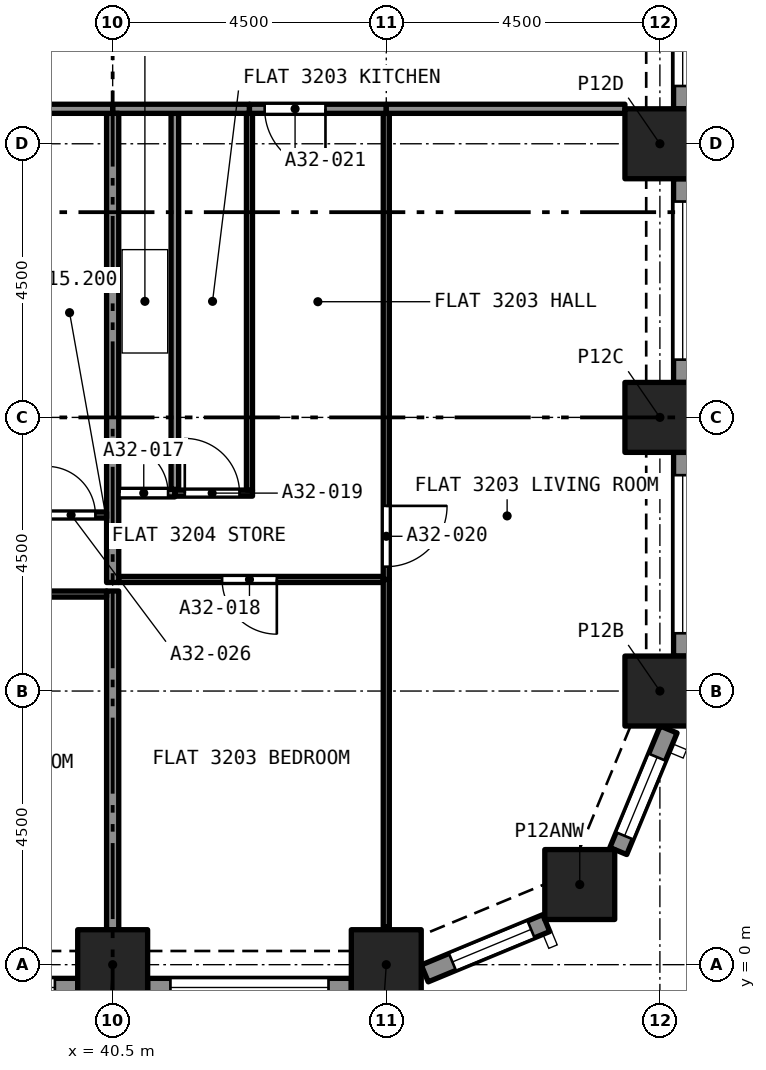
"""IFC4 building model, lengths in metres.
Left out: names, types, materials, properties, quantities, classifications, styles, units other than length and angle.
Written with IfcOpenShell. Run it as: python <this file> out.ifc"""

import sys

from ifc_helpers import new_model, si_unit, direction, frame, frame_2d, origin, origin_2d, place, context, subcontext, project, spatial, rectangle, extrude, element, fill, save


model = new_model("IFC4")
c1 = context("Model", 3, precision=1e-05, world=origin(), true_north=direction((0.0, 1.0)))
c2 = subcontext(c1, "Body", "Model", "MODEL_VIEW")
j1 = project(units=[si_unit("LENGTHUNIT", "METRE"), si_unit("PLANEANGLEUNIT", "RADIAN")], contexts=[c1])
p1 = place(None, origin())
s1 = spatial("IfcSite", under=j1, at=p1, CompositionType="ELEMENT")
p2 = place(p1, origin())
s2 = spatial("IfcBuilding", under=s1, at=p2, CompositionType="ELEMENT")
p3 = place(p2, frame((0.0, 0.0, 115.2)))
s3 = spatial("IfcBuildingStorey", under=s2, at=p3, CompositionType="ELEMENT", Elevation=115.2)
for number, where, z_axis, x_axis in (
    (1, (40.5, 0.0, 0.0), (0.0, 0.0, 1.0), (1.0, 0.0, 0.0)),
    (2, (45.0, 0.0, 0.0), (0.0, 0.0, 1.0), (1.0, 0.0, 0.0)),
    (3, (48.182, 1.318, 0.0), (0.0, 0.0, 1.0), (1.0, 0.0, 0.0)),
    (4, (49.5, 4.5, 0.0), (0.0, 0.0, 1.0), (1.0, 0.0, 0.0)),
    (5, (49.5, 9.0, 0.0), (0.0, 0.0, 1.0), (1.0, 0.0, 0.0)),
    (6, (49.5, 13.5, 0.0), (0.0, 0.0, 1.0), (1.0, 0.0, 0.0)),
):
    element("IfcColumn", number, at=place(p3, frame(where, z_axis=z_axis, x_axis=x_axis)), inside=s3, PredefinedType="COLUMN", context=c2, shape_type="SweptSolid", body=[
        extrude(rectangle(XDim=1.15, YDim=1.15, at=origin_2d()), origin(), (0.0, 0.0, 1.0), 3.2),
    ])
p4 = place(p3, frame((39.925, -0.375, 0.0), z_axis=(0.0, 0.0, 1.0), x_axis=(-1.0, 0.0, 0.0)))
e7 = element("IfcWall", 7, at=p4, inside=s3, PredefinedType="SOLIDWALL", context=c2, shape_type="SweptSolid", body=[
    extrude(rectangle(XDim=3.35, YDim=0.3, at=frame_2d((1.675, 0.0))), origin(), (0.0, 0.0, 1.0), 3.2),
])
p5 = place(p4, frame((0.375, 0.0, 0.45)))
e8 = element("IfcOpeningElement", 8, at=p5, cuts=e7, PredefinedType="OPENING", context=c2, shape_type="SweptSolid", body=[
    extrude(rectangle(XDim=2.6, YDim=1.95, at=frame_2d((1.3, 0.975))), frame((0.0, 0.16, 0.0), z_axis=(0.0, -1.0, 0.0), x_axis=(1.0, 0.0, 0.0)), (0.0, 0.0, 1.0), 0.32),
])
p6 = place(p3, frame((44.425, -0.375, 0.0), z_axis=(0.0, 0.0, 1.0), x_axis=(-1.0, 0.0, 0.0)))
e9 = element("IfcWall", 9, at=p6, inside=s3, PredefinedType="SOLIDWALL", context=c2, shape_type="SweptSolid", body=[
    extrude(rectangle(XDim=3.35, YDim=0.3, at=frame_2d((1.675, 0.0))), origin(), (0.0, 0.0, 1.0), 3.2),
])
p7 = place(p6, frame((0.375, 0.0, 0.45)))
e10 = element("IfcOpeningElement", 10, at=p7, cuts=e9, PredefinedType="OPENING", context=c2, shape_type="SweptSolid", body=[
    extrude(rectangle(XDim=2.6, YDim=1.95, at=frame_2d((1.3, 0.975))), frame((0.0, 0.16, 0.0), z_axis=(0.0, -1.0, 0.0), x_axis=(1.0, 0.0, 0.0)), (0.0, 0.0, 1.0), 0.32),
])
p8 = place(p3, frame((47.631, 0.684, 0.0), z_axis=(0.0, 0.0, 1.0), x_axis=(-0.923862802911, -0.382723818695, 0.0)))
e11 = element("IfcWall", 11, at=p8, inside=s3, PredefinedType="SOLIDWALL", context=c2, shape_type="SweptSolid", body=[
    extrude(rectangle(XDim=2.164, YDim=0.3, at=frame_2d((1.082, 0.0))), origin(), (0.0, 0.0, 1.0), 3.2),
])
p9 = place(p8, frame((0.271, 0.0, 0.45)))
e12 = element("IfcOpeningElement", 12, at=p9, cuts=e11, PredefinedType="OPENING", context=c2, shape_type="SweptSolid", body=[
    extrude(rectangle(XDim=1.4, YDim=1.95, at=frame_2d((0.7, 0.975))), frame((0.0, 0.16, 0.0), z_axis=(0.0, -1.0, 0.0), x_axis=(1.0, 0.0, 0.0)), (0.0, 0.0, 1.0), 0.32),
])
p10 = place(p3, frame((49.644, 3.868, 0.0), z_axis=(0.0, 0.0, 1.0), x_axis=(-0.382723818695, -0.923862802911, 0.0)))
e13 = element("IfcWall", 13, at=p10, inside=s3, PredefinedType="SOLIDWALL", context=c2, shape_type="SweptSolid", body=[
    extrude(rectangle(XDim=2.164, YDim=0.3, at=frame_2d((1.082, 0.0))), origin(), (0.0, 0.0, 1.0), 3.2),
])
p11 = place(p10, frame((0.493, 0.0, 0.45)))
e14 = element("IfcOpeningElement", 14, at=p11, cuts=e13, PredefinedType="OPENING", context=c2, shape_type="SweptSolid", body=[
    extrude(rectangle(XDim=1.4, YDim=1.95, at=frame_2d((0.7, 0.975))), frame((0.0, 0.16, 0.0), z_axis=(0.0, -1.0, 0.0), x_axis=(1.0, 0.0, 0.0)), (0.0, 0.0, 1.0), 0.32),
])
p12 = place(p3, frame((49.875, 8.425, 0.0), z_axis=(0.0, 0.0, 1.0), x_axis=(0.0, -1.0, 0.0)))
e15 = element("IfcWall", 15, at=p12, inside=s3, PredefinedType="SOLIDWALL", context=c2, shape_type="SweptSolid", body=[
    extrude(rectangle(XDim=3.35, YDim=0.3, at=frame_2d((1.675, 0.0))), origin(), (0.0, 0.0, 1.0), 3.2),
])
p13 = place(p12, frame((0.375, 0.0, 0.45)))
e16 = element("IfcOpeningElement", 16, at=p13, cuts=e15, PredefinedType="OPENING", context=c2, shape_type="SweptSolid", body=[
    extrude(rectangle(XDim=2.6, YDim=1.95, at=frame_2d((1.3, 0.975))), frame((0.0, 0.16, 0.0), z_axis=(0.0, -1.0, 0.0), x_axis=(1.0, 0.0, 0.0)), (0.0, 0.0, 1.0), 0.32),
])
p14 = place(p3, frame((49.875, 12.925, 0.0), z_axis=(0.0, 0.0, 1.0), x_axis=(0.0, -1.0, 0.0)))
e17 = element("IfcWall", 17, at=p14, inside=s3, PredefinedType="SOLIDWALL", context=c2, shape_type="SweptSolid", body=[
    extrude(rectangle(XDim=3.35, YDim=0.3, at=frame_2d((1.675, 0.0))), origin(), (0.0, 0.0, 1.0), 3.2),
])
p15 = place(p14, frame((0.375, 0.0, 0.45)))
e18 = element("IfcOpeningElement", 18, at=p15, cuts=e17, PredefinedType="OPENING", context=c2, shape_type="SweptSolid", body=[
    extrude(rectangle(XDim=2.6, YDim=1.95, at=frame_2d((1.3, 0.975))), frame((0.0, 0.16, 0.0), z_axis=(0.0, -1.0, 0.0), x_axis=(1.0, 0.0, 0.0)), (0.0, 0.0, 1.0), 0.32),
])
p16 = place(p3, frame((49.875, 17.425, 0.0), z_axis=(0.0, 0.0, 1.0), x_axis=(0.0, -1.0, 0.0)))
e19 = element("IfcWall", 19, at=p16, inside=s3, PredefinedType="SOLIDWALL", context=c2, shape_type="SweptSolid", body=[
    extrude(rectangle(XDim=3.35, YDim=0.3, at=frame_2d((1.675, 0.0))), origin(), (0.0, 0.0, 1.0), 3.2),
])
p17 = place(p16, frame((0.375, 0.0, 0.45)))
e20 = element("IfcOpeningElement", 20, at=p17, cuts=e19, PredefinedType="OPENING", context=c2, shape_type="SweptSolid", body=[
    extrude(rectangle(XDim=2.6, YDim=1.95, at=frame_2d((1.3, 0.975))), frame((0.0, 0.16, 0.0), z_axis=(0.0, -1.0, 0.0), x_axis=(1.0, 0.0, 0.0)), (0.0, 0.0, 1.0), 0.32),
])
p18 = place(p3, frame((40.6, 7.755, 0.0), z_axis=(0.0, 0.0, 1.0), x_axis=(1.0, 0.0, 0.0)))
e21 = element("IfcWall", 21, at=p18, inside=s3, PredefinedType="PARTITIONING", context=c2, shape_type="SweptSolid", body=[
    extrude(rectangle(XDim=0.923, YDim=0.125, at=frame_2d((0.461, 0.0))), origin(), (0.0, 0.0, 1.0), 2.9),
])
p19 = place(p18, frame((0.011, 0.0, 0.0)))
e22 = element("IfcOpeningElement", 22, at=p19, cuts=e21, PredefinedType="OPENING", context=c2, shape_type="SweptSolid", body=[
    extrude(rectangle(XDim=0.8, YDim=2.1, at=frame_2d((0.4, 1.05))), frame((0.0, 0.073, 0.0), z_axis=(0.0, -1.0, 0.0), x_axis=(1.0, 0.0, 0.0)), (0.0, 0.0, 1.0), 0.145),
])
p20 = place(p3, frame((41.523, 7.817, 0.0), z_axis=(0.0, 0.0, 1.0), x_axis=(0.0, 1.0, 0.0)))
e23 = element("IfcWall", 23, at=p20, inside=s3, PredefinedType="PARTITIONING", context=c2, shape_type="SweptSolid", body=[
    extrude(rectangle(XDim=6.183, YDim=0.125, at=frame_2d((3.091, 0.0))), origin(), (0.0, 0.0, 1.0), 2.9),
])
p21 = place(p3, frame((40.5, 14.075, 0.0), z_axis=(0.0, 0.0, 1.0), x_axis=(1.0, 0.0, 0.0)))
e24 = element("IfcWall", 24, at=p21, inside=s3, PredefinedType="PARTITIONING", context=c2, shape_type="SweptSolid", body=[
    extrude(rectangle(XDim=2.25, YDim=0.15, at=frame_2d((1.125, 0.0))), origin(), (0.0, 0.0, 1.0), 2.9),
])
p22 = place(p3, frame((44.95, 6.335, 0.0), z_axis=(0.0, 0.0, 1.0), x_axis=(-1.0, 0.0, 0.0)))
e25 = element("IfcWall", 25, at=p22, inside=s3, PredefinedType="PARTITIONING", context=c2, shape_type="SweptSolid", body=[
    extrude(rectangle(XDim=4.35, YDim=0.1, at=frame_2d((2.175, 0.0))), origin(), (0.0, 0.0, 1.0), 2.9),
])
p23 = place(p22, frame((1.75, 0.0, 0.0)))
e26 = element("IfcOpeningElement", 26, at=p23, cuts=e25, PredefinedType="OPENING", context=c2, shape_type="SweptSolid", body=[
    extrude(rectangle(XDim=0.9, YDim=2.1, at=frame_2d((0.45, 1.05))), frame((0.0, 0.06, 0.0), z_axis=(0.0, -1.0, 0.0), x_axis=(1.0, 0.0, 0.0)), (0.0, 0.0, 1.0), 0.12),
])
p24 = place(p3, frame((45.0, 0.622, 0.0), z_axis=(0.0, 0.0, 1.0), x_axis=(0.0, 1.0, 0.0)))
e27 = element("IfcWall", 27, at=p24, inside=s3, PredefinedType="PARTITIONING", context=c2, shape_type="SweptSolid", body=[
    extrude(rectangle(XDim=5.713, YDim=0.1, at=frame_2d((2.856, 0.0))), origin(), (0.0, 0.0, 1.0), 2.9),
])
p25 = place(p3, frame((40.5, 0.575, 0.0), z_axis=(0.0, 0.0, 1.0), x_axis=(0.0, 1.0, 0.0)))
e28 = element("IfcWall", 28, at=p25, inside=s3, PredefinedType="PARTITIONING", context=c2, shape_type="SweptSolid", body=[
    extrude(rectangle(XDim=5.57, YDim=0.2, at=frame_2d((2.785, 0.0))), origin(), (0.0, 0.0, 1.0), 2.9),
])
p26 = place(p3, frame((41.523, 7.755, 0.0), z_axis=(0.0, 0.0, 1.0), x_axis=(1.0, 0.0, 0.0)))
e29 = element("IfcWall", 29, at=p26, inside=s3, PredefinedType="PARTITIONING", context=c2, shape_type="SweptSolid", body=[
    extrude(rectangle(XDim=1.277, YDim=0.1, at=frame_2d((0.639, 0.0))), origin(), (0.0, 0.0, 1.0), 2.9),
])
p27 = place(p26, frame((0.164, 0.0, 0.0)))
e30 = element("IfcOpeningElement", 30, at=p27, cuts=e29, PredefinedType="OPENING", context=c2, shape_type="SweptSolid", body=[
    extrude(rectangle(XDim=0.9, YDim=2.1, at=frame_2d((0.45, 1.05))), frame((0.0, 0.06, 0.0), z_axis=(0.0, -1.0, 0.0), x_axis=(1.0, 0.0, 0.0)), (0.0, 0.0, 1.0), 0.12),
])
p28 = place(p3, frame((42.75, 7.805, 0.0), z_axis=(0.0, 0.0, 1.0), x_axis=(0.0, 1.0, 0.0)))
e31 = element("IfcWall", 31, at=p28, inside=s3, PredefinedType="PARTITIONING", context=c2, shape_type="SweptSolid", body=[
    extrude(rectangle(XDim=6.195, YDim=0.1, at=frame_2d((3.098, 0.0))), origin(), (0.0, 0.0, 1.0), 2.9),
])
p29 = place(p3, frame((45.0, 14.0, 0.0), z_axis=(0.0, 0.0, 1.0), x_axis=(0.0, -1.0, 0.0)))
e32 = element("IfcWall", 32, at=p29, inside=s3, PredefinedType="PARTITIONING", context=c2, shape_type="SweptSolid", body=[
    extrude(rectangle(XDim=7.665, YDim=0.1, at=frame_2d((3.833, 0.0))), origin(), (0.0, 0.0, 1.0), 2.9),
])
p30 = place(p29, frame((6.455, 0.0, 0.0)))
e33 = element("IfcOpeningElement", 33, at=p30, cuts=e32, PredefinedType="OPENING", context=c2, shape_type="SweptSolid", body=[
    extrude(rectangle(XDim=1.0, YDim=2.1, at=frame_2d((0.5, 1.05))), frame((0.0, 0.06, 0.0), z_axis=(0.0, -1.0, 0.0), x_axis=(1.0, 0.0, 0.0)), (0.0, 0.0, 1.0), 0.12),
])
p31 = place(p3, frame((40.5, 6.285, 0.0), z_axis=(0.0, 0.0, 1.0), x_axis=(0.0, 1.0, 0.0)))
e34 = element("IfcWall", 34, at=p31, inside=s3, PredefinedType="PARTITIONING", context=c2, shape_type="SweptSolid", body=[
    extrude(rectangle(XDim=7.715, YDim=0.2, at=frame_2d((3.857, 0.0))), origin(), (0.0, 0.0, 1.0), 2.9),
])
p32 = place(p3, frame((45.0, 14.075, 0.0), z_axis=(0.0, 0.0, 1.0), x_axis=(-1.0, 0.0, 0.0)))
e35 = element("IfcWall", 35, at=p32, inside=s3, PredefinedType="PARTITIONING", context=c2, shape_type="SweptSolid", body=[
    extrude(rectangle(XDim=2.25, YDim=0.15, at=frame_2d((1.125, 0.0))), origin(), (0.0, 0.0, 1.0), 2.9),
])
p33 = place(p32, frame((1.0, 0.0, 0.0)))
e36 = element("IfcOpeningElement", 36, at=p33, cuts=e35, PredefinedType="OPENING", context=c2, shape_type="SweptSolid", body=[
    extrude(rectangle(XDim=1.0, YDim=2.1, at=frame_2d((0.5, 1.05))), frame((0.0, 0.085, 0.0), z_axis=(0.0, -1.0, 0.0), x_axis=(1.0, 0.0, 0.0)), (0.0, 0.0, 1.0), 0.17),
])
p34 = place(p3, frame((45.0, 14.075, 0.0), z_axis=(0.0, 0.0, 1.0), x_axis=(1.0, 0.0, 0.0)))
e37 = element("IfcWall", 37, at=p34, inside=s3, PredefinedType="PARTITIONING", context=c2, shape_type="SweptSolid", body=[
    extrude(rectangle(XDim=3.925, YDim=0.15, at=frame_2d((1.962, 0.0))), origin(), (0.0, 0.0, 1.0), 2.9),
])
p35 = place(p3, frame((40.4, 6.095, 0.0), z_axis=(0.0, 0.0, 1.0), x_axis=(-1.0, 0.0, 0.0)))
e38 = element("IfcWall", 38, at=p35, inside=s3, PredefinedType="PARTITIONING", context=c2, shape_type="SweptSolid", body=[
    extrude(rectangle(XDim=4.4, YDim=0.1, at=frame_2d((2.2, 0.0))), origin(), (0.0, 0.0, 1.0), 2.9),
])
p36 = place(p35, frame((1.7, 0.0, 0.0)))
e39 = element("IfcOpeningElement", 39, at=p36, cuts=e38, PredefinedType="OPENING", context=c2, shape_type="SweptSolid", body=[
    extrude(rectangle(XDim=0.9, YDim=2.1, at=frame_2d((0.45, 1.05))), frame((0.0, 0.06, 0.0), z_axis=(0.0, -1.0, 0.0), x_axis=(1.0, 0.0, 0.0)), (0.0, 0.0, 1.0), 0.12),
])
p37 = place(p3, frame((39.133, 7.395, 0.0), z_axis=(0.0, 0.0, 1.0), x_axis=(1.0, 0.0, 0.0)))
e40 = element("IfcWall", 40, at=p37, inside=s3, PredefinedType="PARTITIONING", context=c2, shape_type="SweptSolid", body=[
    extrude(rectangle(XDim=1.267, YDim=0.1, at=frame_2d((0.634, 0.0))), origin(), (0.0, 0.0, 1.0), 2.9),
])
p38 = place(p37, frame((0.284, 0.0, 0.0)))
e41 = element("IfcOpeningElement", 41, at=p38, cuts=e40, PredefinedType="OPENING", context=c2, shape_type="SweptSolid", body=[
    extrude(rectangle(XDim=0.8, YDim=2.1, at=frame_2d((0.4, 1.05))), frame((0.0, 0.06, 0.0), z_axis=(0.0, -1.0, 0.0), x_axis=(1.0, 0.0, 0.0)), (0.0, 0.0, 1.0), 0.12),
])
p39 = place(p3, frame((36.75, 14.075, 0.0), z_axis=(0.0, 0.0, 1.0), x_axis=(1.0, 0.0, 0.0)))
e42 = element("IfcWall", 42, at=p39, inside=s3, PredefinedType="PARTITIONING", context=c2, shape_type="SweptSolid", body=[
    extrude(rectangle(XDim=3.75, YDim=0.15, at=frame_2d((1.875, 0.0))), origin(), (0.0, 0.0, 1.0), 2.9),
])
p40 = place(p5, origin())
e43 = element("IfcWindow", 43, at=p40, inside=s3, PartitioningType="SINGLE_PANEL", PredefinedType="WINDOW", context=c2, shape_type="SweptSolid", body=[
    extrude(rectangle(XDim=2.6, YDim=1.95, at=frame_2d((1.3, 0.975))), frame((0.0, 0.03, 0.0), z_axis=(0.0, -1.0, 0.0), x_axis=(1.0, 0.0, 0.0)), (0.0, 0.0, 1.0), 0.06),
])
fill(e8, e43)
p41 = place(p7, origin())
e44 = element("IfcWindow", 44, at=p41, inside=s3, PartitioningType="SINGLE_PANEL", PredefinedType="WINDOW", context=c2, shape_type="SweptSolid", body=[
    extrude(rectangle(XDim=2.6, YDim=1.95, at=frame_2d((1.3, 0.975))), frame((0.0, 0.03, 0.0), z_axis=(0.0, -1.0, 0.0), x_axis=(1.0, 0.0, 0.0)), (0.0, 0.0, 1.0), 0.06),
])
fill(e10, e44)
p42 = place(p9, origin())
e45 = element("IfcWindow", 45, at=p42, inside=s3, PartitioningType="SINGLE_PANEL", PredefinedType="WINDOW", context=c2, shape_type="SweptSolid", body=[
    extrude(rectangle(XDim=1.4, YDim=1.95, at=frame_2d((0.7, 0.975))), frame((0.0, 0.03, 0.0), z_axis=(0.0, -1.0, 0.0), x_axis=(1.0, 0.0, 0.0)), (0.0, 0.0, 1.0), 0.06),
])
fill(e12, e45)
p43 = place(p11, origin())
e46 = element("IfcWindow", 46, at=p43, inside=s3, PartitioningType="SINGLE_PANEL", PredefinedType="WINDOW", context=c2, shape_type="SweptSolid", body=[
    extrude(rectangle(XDim=1.4, YDim=1.95, at=frame_2d((0.7, 0.975))), frame((0.0, 0.03, 0.0), z_axis=(0.0, -1.0, 0.0), x_axis=(1.0, 0.0, 0.0)), (0.0, 0.0, 1.0), 0.06),
])
fill(e14, e46)
p44 = place(p13, origin())
e47 = element("IfcWindow", 47, at=p44, inside=s3, PartitioningType="SINGLE_PANEL", PredefinedType="WINDOW", context=c2, shape_type="SweptSolid", body=[
    extrude(rectangle(XDim=2.6, YDim=1.95, at=frame_2d((1.3, 0.975))), frame((0.0, 0.03, 0.0), z_axis=(0.0, -1.0, 0.0), x_axis=(1.0, 0.0, 0.0)), (0.0, 0.0, 1.0), 0.06),
])
fill(e16, e47)
p45 = place(p15, origin())
e48 = element("IfcWindow", 48, at=p45, inside=s3, PartitioningType="SINGLE_PANEL", PredefinedType="WINDOW", context=c2, shape_type="SweptSolid", body=[
    extrude(rectangle(XDim=2.6, YDim=1.95, at=frame_2d((1.3, 0.975))), frame((0.0, 0.03, 0.0), z_axis=(0.0, -1.0, 0.0), x_axis=(1.0, 0.0, 0.0)), (0.0, 0.0, 1.0), 0.06),
])
fill(e18, e48)
p46 = place(p17, origin())
e49 = element("IfcWindow", 49, at=p46, inside=s3, PartitioningType="SINGLE_PANEL", PredefinedType="WINDOW", context=c2, shape_type="SweptSolid", body=[
    extrude(rectangle(XDim=2.6, YDim=1.95, at=frame_2d((1.3, 0.975))), frame((0.0, 0.03, 0.0), z_axis=(0.0, -1.0, 0.0), x_axis=(1.0, 0.0, 0.0)), (0.0, 0.0, 1.0), 0.06),
])
fill(e20, e49)
p47 = place(p19, origin())
e50 = element("IfcDoor", 50, at=p47, inside=s3, OperationType="SINGLE_SWING_LEFT", PredefinedType="DOOR", context=c2, shape_type="SweptSolid", body=[
    extrude(rectangle(XDim=0.8, YDim=2.1, at=frame_2d((0.4, 1.05))), frame((0.0, 0.025, 0.0), z_axis=(0.0, -1.0, 0.0), x_axis=(1.0, 0.0, 0.0)), (0.0, 0.0, 1.0), 0.05),
])
fill(e22, e50)
p48 = place(p23, origin())
e51 = element("IfcDoor", 51, at=p48, inside=s3, OperationType="SINGLE_SWING_RIGHT", PredefinedType="DOOR", context=c2, shape_type="SweptSolid", body=[
    extrude(rectangle(XDim=0.9, YDim=2.1, at=frame_2d((0.45, 1.05))), frame((0.0, 0.025, 0.0), z_axis=(0.0, -1.0, 0.0), x_axis=(1.0, 0.0, 0.0)), (0.0, 0.0, 1.0), 0.05),
])
fill(e26, e51)
p49 = place(p27, origin())
e52 = element("IfcDoor", 52, at=p49, inside=s3, OperationType="SINGLE_SWING_LEFT", PredefinedType="DOOR", context=c2, shape_type="SweptSolid", body=[
    extrude(rectangle(XDim=0.9, YDim=2.1, at=frame_2d((0.45, 1.05))), frame((0.0, 0.025, 0.0), z_axis=(0.0, -1.0, 0.0), x_axis=(1.0, 0.0, 0.0)), (0.0, 0.0, 1.0), 0.05),
])
fill(e30, e52)
p50 = place(p30, origin())
e53 = element("IfcDoor", 53, at=p50, inside=s3, OperationType="SINGLE_SWING_RIGHT", PredefinedType="DOOR", context=c2, shape_type="SweptSolid", body=[
    extrude(rectangle(XDim=1.0, YDim=2.1, at=frame_2d((0.5, 1.05))), frame((0.0, 0.025, 0.0), z_axis=(0.0, -1.0, 0.0), x_axis=(1.0, 0.0, 0.0)), (0.0, 0.0, 1.0), 0.05),
])
fill(e33, e53)
p51 = place(p33, origin())
e54 = element("IfcDoor", 54, at=p51, inside=s3, OperationType="SINGLE_SWING_RIGHT", PredefinedType="DOOR", context=c2, shape_type="SweptSolid", body=[
    extrude(rectangle(XDim=1.0, YDim=2.1, at=frame_2d((0.5, 1.05))), frame((0.0, 0.025, 0.0), z_axis=(0.0, -1.0, 0.0), x_axis=(1.0, 0.0, 0.0)), (0.0, 0.0, 1.0), 0.05),
])
fill(e36, e54)
p52 = place(p38, origin())
e55 = element("IfcDoor", 55, at=p52, inside=s3, OperationType="SINGLE_SWING_RIGHT", PredefinedType="DOOR", context=c2, shape_type="SweptSolid", body=[
    extrude(rectangle(XDim=0.8, YDim=2.1, at=frame_2d((0.4, 1.05))), frame((0.0, 0.025, 0.0), z_axis=(0.0, -1.0, 0.0), x_axis=(1.0, 0.0, 0.0)), (0.0, 0.0, 1.0), 0.05),
])
fill(e41, e55)
save(model, sys.argv[1])
